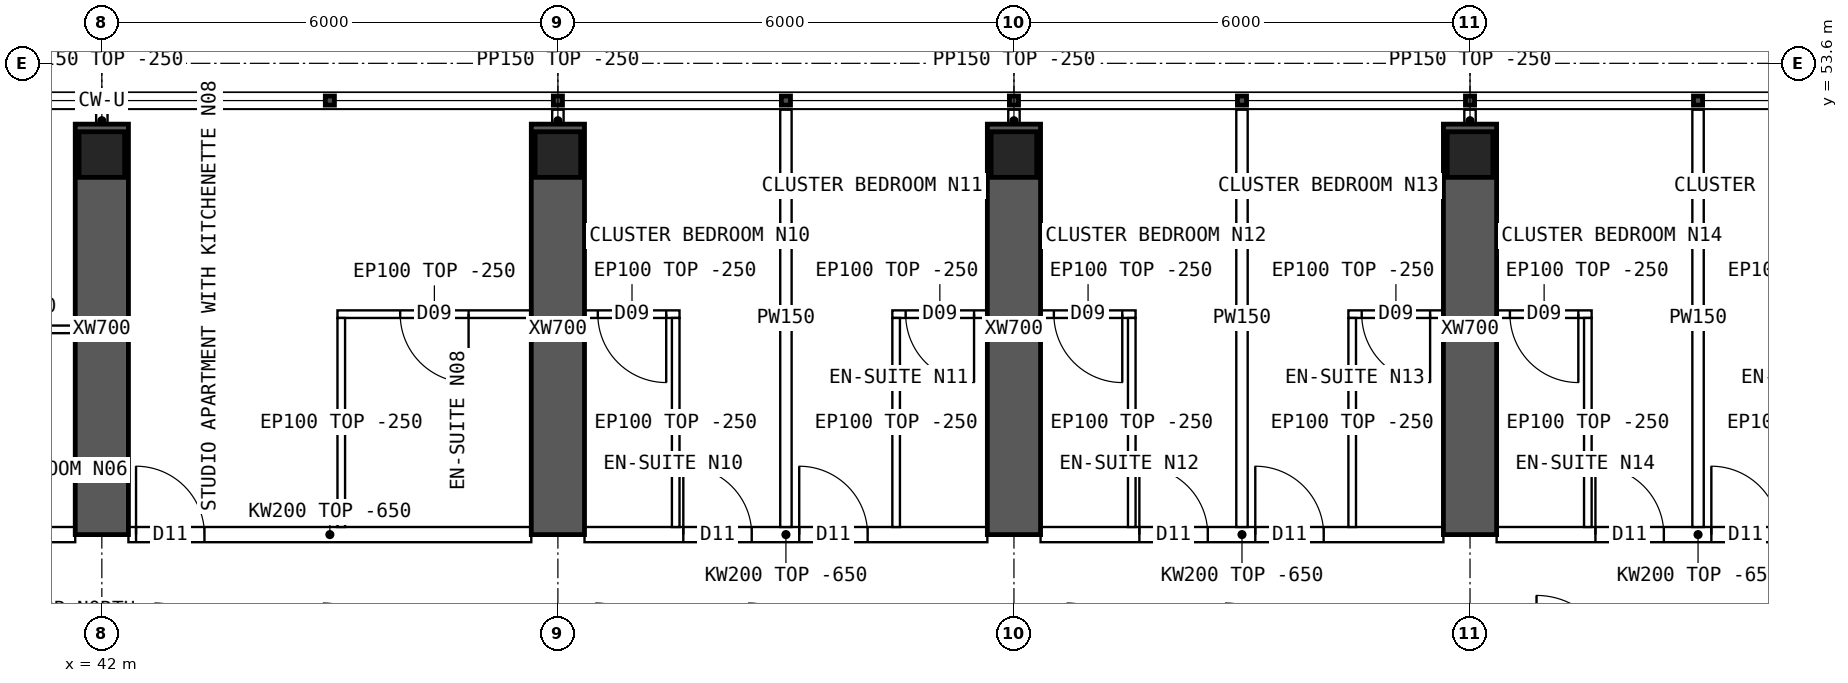
"""IFC4 building model, lengths in metres.
Left out: names, types, materials, properties, quantities, classifications, styles, units other than length and angle.
Written with IfcOpenShell. Run it as: python <this file> out.ifc"""

import sys

from ifc_helpers import new_model, si_unit, direction, frame, frame_2d, origin, origin_2d, place, context, subcontext, project, spatial, polyline, rectangle, hollow_rectangle, outline, extrude, element, fill, save


model = new_model("IFC4")
c1 = context("Model", 3, precision=1e-05, world=origin(), true_north=direction((0.0, 1.0)))
c2 = subcontext(c1, "Body", "Model", "MODEL_VIEW")
j1 = project(units=[si_unit("LENGTHUNIT", "METRE"), si_unit("PLANEANGLEUNIT", "RADIAN")], contexts=[c1])
p1 = place(None, origin())
s1 = spatial("IfcSite", under=j1, at=p1, CompositionType="ELEMENT")
p2 = place(p1, origin())
s2 = spatial("IfcBuilding", under=s1, at=p2, CompositionType="ELEMENT")
p3 = place(p2, frame((0.0, 0.0, 239.05)))
s3 = spatial("IfcBuildingStorey", under=s2, at=p3, CompositionType="ELEMENT", Elevation=239.05)
for number, where, z_axis, x_axis in (
    (1, (42.0, 52.4, 0.0), (0.0, 0.0, 1.0), (1.0, 0.0, 0.0)),
    (2, (48.0, 52.4, 0.0), (0.0, 0.0, 1.0), (1.0, 0.0, 0.0)),
    (3, (54.0, 52.4, 0.0), (0.0, 0.0, 1.0), (1.0, 0.0, 0.0)),
    (4, (60.0, 52.4, 0.0), (0.0, 0.0, 1.0), (1.0, 0.0, 0.0)),
):
    element("IfcColumn", number, at=place(p3, frame(where, z_axis=z_axis, x_axis=x_axis)), inside=s3, PredefinedType="COLUMN", context=c2, shape_type="SweptSolid", body=[
        extrude(hollow_rectangle(XDim=0.6, YDim=0.6, WallThickness=0.06, at=origin_2d()), origin(), (0.0, 0.0, 1.0), 3.75),
    ])
for number, where, z_axis, x_axis in (
    (5, (42.0, 47.4, 0.0), (0.0, 0.0, 1.0), (0.0, 1.0, 0.0)),
    (6, (48.0, 47.4, 0.0), (0.0, 0.0, 1.0), (0.0, 1.0, 0.0)),
    (7, (54.0, 47.4, 0.0), (0.0, 0.0, 1.0), (0.0, 1.0, 0.0)),
    (8, (60.0, 47.4, 0.0), (0.0, 0.0, 1.0), (0.0, 1.0, 0.0)),
):
    element("IfcWall", number, at=place(p3, frame(where, z_axis=z_axis, x_axis=x_axis)), inside=s3, PredefinedType="SHEAR", context=c2, shape_type="SweptSolid", body=[
        extrude(rectangle(XDim=5.4, YDim=0.7, at=frame_2d((2.7, 0.0))), origin(), (0.0, 0.0, 1.0), 3.75),
    ])
p4 = place(p3, frame((36.35, 47.4, 0.0), z_axis=(0.0, 0.0, 1.0), x_axis=(1.0, 0.0, 0.0)))
e9 = element("IfcWall", 9, at=p4, inside=s3, PredefinedType="SOLIDWALL", context=c2, shape_type="SweptSolid", body=[
    extrude(outline(polyline([(0.0, 0.0), (5.3, 0.0), (5.3, 3.1), (0.0, 3.1), (0.0, 0.0)])), frame((0.0, 0.1, 0.0), z_axis=(0.0, -1.0, 0.0), x_axis=(1.0, 0.0, 0.0)), (0.0, 0.0, 1.0), 0.2),
])
p5 = place(p4, frame((0.3, 0.0, 0.0)))
e10 = element("IfcOpeningElement", 10, at=p5, cuts=e9, PredefinedType="OPENING", context=c2, shape_type="SweptSolid", body=[
    extrude(rectangle(XDim=1.0, YDim=2.1, at=frame_2d((0.5, 1.05))), frame((0.0, 0.11, 0.0), z_axis=(0.0, -1.0, 0.0), x_axis=(1.0, 0.0, 0.0)), (0.0, 0.0, 1.0), 0.22),
])
p6 = place(p3, frame((42.35, 47.4, 0.0), z_axis=(0.0, 0.0, 1.0), x_axis=(1.0, 0.0, 0.0)))
e11 = element("IfcWall", 11, at=p6, inside=s3, PredefinedType="SOLIDWALL", context=c2, shape_type="SweptSolid", body=[
    extrude(outline(polyline([(0.0, 0.0), (5.3, 0.0), (5.3, 3.1), (0.0, 3.1), (0.0, 0.0)])), frame((0.0, 0.1, 0.0), z_axis=(0.0, -1.0, 0.0), x_axis=(1.0, 0.0, 0.0)), (0.0, 0.0, 1.0), 0.2),
])
p7 = place(p6, frame((0.1, 0.0, 0.0)))
e12 = element("IfcOpeningElement", 12, at=p7, cuts=e11, PredefinedType="OPENING", context=c2, shape_type="SweptSolid", body=[
    extrude(rectangle(XDim=0.9, YDim=2.1, at=frame_2d((0.45, 1.05))), frame((0.0, 0.11, 0.0), z_axis=(0.0, -1.0, 0.0), x_axis=(1.0, 0.0, 0.0)), (0.0, 0.0, 1.0), 0.22),
])
p8 = place(p3, frame((48.35, 47.4, 0.0), z_axis=(0.0, 0.0, 1.0), x_axis=(1.0, 0.0, 0.0)))
e13 = element("IfcWall", 13, at=p8, inside=s3, PredefinedType="SOLIDWALL", context=c2, shape_type="SweptSolid", body=[
    extrude(outline(polyline([(0.0, 0.0), (5.3, 0.0), (5.3, 3.1), (0.0, 3.1), (0.0, 0.0)])), frame((0.0, 0.1, 0.0), z_axis=(0.0, -1.0, 0.0), x_axis=(1.0, 0.0, 0.0)), (0.0, 0.0, 1.0), 0.2),
])
p9 = place(p8, frame((1.3, 0.0, 0.0)))
e14 = element("IfcOpeningElement", 14, at=p9, cuts=e13, PredefinedType="OPENING", context=c2, shape_type="SweptSolid", body=[
    extrude(rectangle(XDim=0.9, YDim=2.1, at=frame_2d((0.45, 1.05))), frame((0.0, 0.11, 0.0), z_axis=(0.0, -1.0, 0.0), x_axis=(1.0, 0.0, 0.0)), (0.0, 0.0, 1.0), 0.22),
])
p10 = place(p8, frame((2.825, 0.0, 0.0)))
e15 = element("IfcOpeningElement", 15, at=p10, cuts=e13, PredefinedType="OPENING", context=c2, shape_type="SweptSolid", body=[
    extrude(rectangle(XDim=0.9, YDim=2.1, at=frame_2d((0.45, 1.05))), frame((0.0, 0.11, 0.0), z_axis=(0.0, -1.0, 0.0), x_axis=(1.0, 0.0, 0.0)), (0.0, 0.0, 1.0), 0.22),
])
p11 = place(p3, frame((54.35, 47.4, 0.0), z_axis=(0.0, 0.0, 1.0), x_axis=(1.0, 0.0, 0.0)))
e16 = element("IfcWall", 16, at=p11, inside=s3, PredefinedType="SOLIDWALL", context=c2, shape_type="SweptSolid", body=[
    extrude(outline(polyline([(0.0, 0.0), (5.3, 0.0), (5.3, 3.1), (0.0, 3.1), (0.0, 0.0)])), frame((0.0, 0.1, 0.0), z_axis=(0.0, -1.0, 0.0), x_axis=(1.0, 0.0, 0.0)), (0.0, 0.0, 1.0), 0.2),
])
p12 = place(p11, frame((1.3, 0.0, 0.0)))
e17 = element("IfcOpeningElement", 17, at=p12, cuts=e16, PredefinedType="OPENING", context=c2, shape_type="SweptSolid", body=[
    extrude(rectangle(XDim=0.9, YDim=2.1, at=frame_2d((0.45, 1.05))), frame((0.0, 0.11, 0.0), z_axis=(0.0, -1.0, 0.0), x_axis=(1.0, 0.0, 0.0)), (0.0, 0.0, 1.0), 0.22),
])
p13 = place(p11, frame((2.825, 0.0, 0.0)))
e18 = element("IfcOpeningElement", 18, at=p13, cuts=e16, PredefinedType="OPENING", context=c2, shape_type="SweptSolid", body=[
    extrude(rectangle(XDim=0.9, YDim=2.1, at=frame_2d((0.45, 1.05))), frame((0.0, 0.11, 0.0), z_axis=(0.0, -1.0, 0.0), x_axis=(1.0, 0.0, 0.0)), (0.0, 0.0, 1.0), 0.22),
])
p14 = place(p3, frame((60.35, 47.4, 0.0), z_axis=(0.0, 0.0, 1.0), x_axis=(1.0, 0.0, 0.0)))
e19 = element("IfcWall", 19, at=p14, inside=s3, PredefinedType="SOLIDWALL", context=c2, shape_type="SweptSolid", body=[
    extrude(outline(polyline([(0.0, 0.0), (5.3, 0.0), (5.3, 3.1), (0.0, 3.1), (0.0, 0.0)])), frame((0.0, 0.1, 0.0), z_axis=(0.0, -1.0, 0.0), x_axis=(1.0, 0.0, 0.0)), (0.0, 0.0, 1.0), 0.2),
])
p15 = place(p14, frame((1.3, 0.0, 0.0)))
e20 = element("IfcOpeningElement", 20, at=p15, cuts=e19, PredefinedType="OPENING", context=c2, shape_type="SweptSolid", body=[
    extrude(rectangle(XDim=0.9, YDim=2.1, at=frame_2d((0.45, 1.05))), frame((0.0, 0.11, 0.0), z_axis=(0.0, -1.0, 0.0), x_axis=(1.0, 0.0, 0.0)), (0.0, 0.0, 1.0), 0.22),
])
p16 = place(p14, frame((2.825, 0.0, 0.0)))
e21 = element("IfcOpeningElement", 21, at=p16, cuts=e19, PredefinedType="OPENING", context=c2, shape_type="SweptSolid", body=[
    extrude(rectangle(XDim=0.9, YDim=2.1, at=frame_2d((0.45, 1.05))), frame((0.0, 0.11, 0.0), z_axis=(0.0, -1.0, 0.0), x_axis=(1.0, 0.0, 0.0)), (0.0, 0.0, 1.0), 0.22),
])
p17 = place(p3, frame((39.0, 50.1, 0.0), z_axis=(0.0, 0.0, 1.0), x_axis=(1.0, 0.0, 0.0)))
e22 = element("IfcWall", 22, at=p17, inside=s3, PredefinedType="PARTITIONING", context=c2, shape_type="SweptSolid", body=[
    extrude(rectangle(XDim=2.65, YDim=0.1, at=frame_2d((1.325, 0.0))), origin(), (0.0, 0.0, 1.0), 3.5),
])
p18 = place(p3, frame((45.1, 50.3, 0.0), z_axis=(0.0, 0.0, 1.0), x_axis=(1.0, 0.0, 0.0)))
e23 = element("IfcWall", 23, at=p18, inside=s3, PredefinedType="PARTITIONING", context=c2, shape_type="SweptSolid", body=[
    extrude(rectangle(XDim=2.55, YDim=0.1, at=frame_2d((1.275, 0.0))), origin(), (0.0, 0.0, 1.0), 3.5),
])
p19 = place(p18, frame((0.825, 0.0, 0.0)))
e24 = element("IfcOpeningElement", 24, at=p19, cuts=e23, PredefinedType="OPENING", context=c2, shape_type="SweptSolid", body=[
    extrude(rectangle(XDim=0.9, YDim=2.1, at=frame_2d((0.45, 1.05))), frame((0.0, 0.06, 0.0), z_axis=(0.0, -1.0, 0.0), x_axis=(1.0, 0.0, 0.0)), (0.0, 0.0, 1.0), 0.12),
])
p20 = place(p3, frame((45.15, 50.25, 0.0), z_axis=(0.0, 0.0, 1.0), x_axis=(0.0, -1.0, 0.0)))
e25 = element("IfcWall", 25, at=p20, inside=s3, PredefinedType="PARTITIONING", context=c2, shape_type="SweptSolid", body=[
    extrude(outline(polyline([(0.0, 0.0), (2.75, 0.0), (2.75, 3.1), (2.702, 3.1), (2.7, 3.5), (0.0, 3.5), (0.0, 0.0)])), frame((0.0, 0.05, 0.0), z_axis=(0.0, -1.0, 0.0), x_axis=(1.0, 0.0, 0.0)), (0.0, 0.0, 1.0), 0.1),
])
p21 = place(p3, frame((51.0, 52.99, 0.0), z_axis=(0.0, 0.0, 1.0), x_axis=(0.0, -1.0, 0.0)))
e26 = element("IfcWall", 26, at=p21, inside=s3, PredefinedType="PARTITIONING", context=c2, shape_type="SweptSolid", body=[
    extrude(outline(polyline([(0.0, 0.0), (5.49, 0.0), (5.49, 3.1), (5.442, 3.1), (5.44, 3.5), (0.792, 3.5), (0.79, 3.1), (0.392, 3.1), (0.39, 3.5), (0.0, 3.5), (0.0, 0.0)])), frame((0.0, 0.075, 0.0), z_axis=(0.0, -1.0, 0.0), x_axis=(1.0, 0.0, 0.0)), (0.0, 0.0, 1.0), 0.15),
])
p22 = place(p3, frame((48.35, 50.3, 0.0), z_axis=(0.0, 0.0, 1.0), x_axis=(1.0, 0.0, 0.0)))
e27 = element("IfcWall", 27, at=p22, inside=s3, PredefinedType="PARTITIONING", context=c2, shape_type="SweptSolid", body=[
    extrude(rectangle(XDim=1.25, YDim=0.1, at=frame_2d((0.625, 0.0))), origin(), (0.0, 0.0, 1.0), 3.5),
])
p23 = place(p22, frame((0.175, 0.0, 0.0)))
e28 = element("IfcOpeningElement", 28, at=p23, cuts=e27, PredefinedType="OPENING", context=c2, shape_type="SweptSolid", body=[
    extrude(rectangle(XDim=0.9, YDim=2.1, at=frame_2d((0.45, 1.05))), frame((0.0, 0.06, 0.0), z_axis=(0.0, -1.0, 0.0), x_axis=(1.0, 0.0, 0.0)), (0.0, 0.0, 1.0), 0.12),
])
p24 = place(p3, frame((49.55, 50.25, 0.0), z_axis=(0.0, 0.0, 1.0), x_axis=(0.0, -1.0, 0.0)))
e29 = element("IfcWall", 29, at=p24, inside=s3, PredefinedType="PARTITIONING", context=c2, shape_type="SweptSolid", body=[
    extrude(outline(polyline([(0.0, 0.0), (2.75, 0.0), (2.75, 3.1), (2.702, 3.1), (2.7, 3.5), (0.0, 3.5), (0.0, 0.0)])), frame((0.0, 0.05, 0.0), z_axis=(0.0, -1.0, 0.0), x_axis=(1.0, 0.0, 0.0)), (0.0, 0.0, 1.0), 0.1),
])
p25 = place(p3, frame((52.4, 50.3, 0.0), z_axis=(0.0, 0.0, 1.0), x_axis=(1.0, 0.0, 0.0)))
e30 = element("IfcWall", 30, at=p25, inside=s3, PredefinedType="PARTITIONING", context=c2, shape_type="SweptSolid", body=[
    extrude(rectangle(XDim=1.25, YDim=0.1, at=frame_2d((0.625, 0.0))), origin(), (0.0, 0.0, 1.0), 3.5),
])
p26 = place(p25, frame((0.175, 0.0, 0.0)))
e31 = element("IfcOpeningElement", 31, at=p26, cuts=e30, PredefinedType="OPENING", context=c2, shape_type="SweptSolid", body=[
    extrude(rectangle(XDim=0.9, YDim=2.1, at=frame_2d((0.45, 1.05))), frame((0.0, 0.06, 0.0), z_axis=(0.0, -1.0, 0.0), x_axis=(1.0, 0.0, 0.0)), (0.0, 0.0, 1.0), 0.12),
])
p27 = place(p3, frame((52.45, 50.25, 0.0), z_axis=(0.0, 0.0, 1.0), x_axis=(0.0, -1.0, 0.0)))
e32 = element("IfcWall", 32, at=p27, inside=s3, PredefinedType="PARTITIONING", context=c2, shape_type="SweptSolid", body=[
    extrude(outline(polyline([(0.0, 0.0), (2.75, 0.0), (2.75, 3.1), (2.702, 3.1), (2.7, 3.5), (0.0, 3.5), (0.0, 0.0)])), frame((0.0, 0.05, 0.0), z_axis=(0.0, -1.0, 0.0), x_axis=(1.0, 0.0, 0.0)), (0.0, 0.0, 1.0), 0.1),
])
p28 = place(p3, frame((57.0, 52.99, 0.0), z_axis=(0.0, 0.0, 1.0), x_axis=(0.0, -1.0, 0.0)))
e33 = element("IfcWall", 33, at=p28, inside=s3, PredefinedType="PARTITIONING", context=c2, shape_type="SweptSolid", body=[
    extrude(outline(polyline([(0.0, 0.0), (5.49, 0.0), (5.49, 3.1), (5.442, 3.1), (5.44, 3.5), (0.792, 3.5), (0.79, 3.1), (0.392, 3.1), (0.39, 3.5), (0.0, 3.5), (0.0, 0.0)])), frame((0.0, 0.075, 0.0), z_axis=(0.0, -1.0, 0.0), x_axis=(1.0, 0.0, 0.0)), (0.0, 0.0, 1.0), 0.15),
])
p29 = place(p3, frame((54.35, 50.3, 0.0), z_axis=(0.0, 0.0, 1.0), x_axis=(1.0, 0.0, 0.0)))
e34 = element("IfcWall", 34, at=p29, inside=s3, PredefinedType="PARTITIONING", context=c2, shape_type="SweptSolid", body=[
    extrude(rectangle(XDim=1.25, YDim=0.1, at=frame_2d((0.625, 0.0))), origin(), (0.0, 0.0, 1.0), 3.5),
])
p30 = place(p29, frame((0.175, 0.0, 0.0)))
e35 = element("IfcOpeningElement", 35, at=p30, cuts=e34, PredefinedType="OPENING", context=c2, shape_type="SweptSolid", body=[
    extrude(rectangle(XDim=0.9, YDim=2.1, at=frame_2d((0.45, 1.05))), frame((0.0, 0.06, 0.0), z_axis=(0.0, -1.0, 0.0), x_axis=(1.0, 0.0, 0.0)), (0.0, 0.0, 1.0), 0.12),
])
p31 = place(p3, frame((55.55, 50.25, 0.0), z_axis=(0.0, 0.0, 1.0), x_axis=(0.0, -1.0, 0.0)))
e36 = element("IfcWall", 36, at=p31, inside=s3, PredefinedType="PARTITIONING", context=c2, shape_type="SweptSolid", body=[
    extrude(outline(polyline([(0.0, 0.0), (2.75, 0.0), (2.75, 3.1), (2.702, 3.1), (2.7, 3.5), (0.0, 3.5), (0.0, 0.0)])), frame((0.0, 0.05, 0.0), z_axis=(0.0, -1.0, 0.0), x_axis=(1.0, 0.0, 0.0)), (0.0, 0.0, 1.0), 0.1),
])
p32 = place(p3, frame((58.4, 50.3, 0.0), z_axis=(0.0, 0.0, 1.0), x_axis=(1.0, 0.0, 0.0)))
e37 = element("IfcWall", 37, at=p32, inside=s3, PredefinedType="PARTITIONING", context=c2, shape_type="SweptSolid", body=[
    extrude(rectangle(XDim=1.25, YDim=0.1, at=frame_2d((0.625, 0.0))), origin(), (0.0, 0.0, 1.0), 3.5),
])
p33 = place(p32, frame((0.175, 0.0, 0.0)))
e38 = element("IfcOpeningElement", 38, at=p33, cuts=e37, PredefinedType="OPENING", context=c2, shape_type="SweptSolid", body=[
    extrude(rectangle(XDim=0.9, YDim=2.1, at=frame_2d((0.45, 1.05))), frame((0.0, 0.06, 0.0), z_axis=(0.0, -1.0, 0.0), x_axis=(1.0, 0.0, 0.0)), (0.0, 0.0, 1.0), 0.12),
])
p34 = place(p3, frame((58.45, 50.25, 0.0), z_axis=(0.0, 0.0, 1.0), x_axis=(0.0, -1.0, 0.0)))
e39 = element("IfcWall", 39, at=p34, inside=s3, PredefinedType="PARTITIONING", context=c2, shape_type="SweptSolid", body=[
    extrude(outline(polyline([(0.0, 0.0), (2.75, 0.0), (2.75, 3.1), (2.702, 3.1), (2.7, 3.5), (0.0, 3.5), (0.0, 0.0)])), frame((0.0, 0.05, 0.0), z_axis=(0.0, -1.0, 0.0), x_axis=(1.0, 0.0, 0.0)), (0.0, 0.0, 1.0), 0.1),
])
p35 = place(p3, frame((63.0, 52.99, 0.0), z_axis=(0.0, 0.0, 1.0), x_axis=(0.0, -1.0, 0.0)))
e40 = element("IfcWall", 40, at=p35, inside=s3, PredefinedType="PARTITIONING", context=c2, shape_type="SweptSolid", body=[
    extrude(outline(polyline([(0.0, 0.0), (5.49, 0.0), (5.49, 3.1), (5.442, 3.1), (5.44, 3.5), (0.792, 3.5), (0.79, 3.1), (0.392, 3.1), (0.39, 3.5), (0.0, 3.5), (0.0, 0.0)])), frame((0.0, 0.075, 0.0), z_axis=(0.0, -1.0, 0.0), x_axis=(1.0, 0.0, 0.0)), (0.0, 0.0, 1.0), 0.15),
])
p36 = place(p3, frame((60.35, 50.3, 0.0), z_axis=(0.0, 0.0, 1.0), x_axis=(1.0, 0.0, 0.0)))
e41 = element("IfcWall", 41, at=p36, inside=s3, PredefinedType="PARTITIONING", context=c2, shape_type="SweptSolid", body=[
    extrude(rectangle(XDim=1.25, YDim=0.1, at=frame_2d((0.625, 0.0))), origin(), (0.0, 0.0, 1.0), 3.5),
])
p37 = place(p36, frame((0.175, 0.0, 0.0)))
e42 = element("IfcOpeningElement", 42, at=p37, cuts=e41, PredefinedType="OPENING", context=c2, shape_type="SweptSolid", body=[
    extrude(rectangle(XDim=0.9, YDim=2.1, at=frame_2d((0.45, 1.05))), frame((0.0, 0.06, 0.0), z_axis=(0.0, -1.0, 0.0), x_axis=(1.0, 0.0, 0.0)), (0.0, 0.0, 1.0), 0.12),
])
p38 = place(p3, frame((61.55, 50.25, 0.0), z_axis=(0.0, 0.0, 1.0), x_axis=(0.0, -1.0, 0.0)))
e43 = element("IfcWall", 43, at=p38, inside=s3, PredefinedType="PARTITIONING", context=c2, shape_type="SweptSolid", body=[
    extrude(outline(polyline([(0.0, 0.0), (2.75, 0.0), (2.75, 3.1), (2.702, 3.1), (2.7, 3.5), (0.0, 3.5), (0.0, 0.0)])), frame((0.0, 0.05, 0.0), z_axis=(0.0, -1.0, 0.0), x_axis=(1.0, 0.0, 0.0)), (0.0, 0.0, 1.0), 0.1),
])
for number, where, z_axis, x_axis in (
    (44, (42.0, 52.7, 0.0), (0.0, 0.0, 1.0), (0.0, 1.0, 0.0)),
    (45, (48.0, 52.7, 0.0), (0.0, 0.0, 1.0), (0.0, 1.0, 0.0)),
    (46, (54.0, 52.7, 0.0), (0.0, 0.0, 1.0), (0.0, 1.0, 0.0)),
    (47, (60.0, 52.7, 0.0), (0.0, 0.0, 1.0), (0.0, 1.0, 0.0)),
):
    element("IfcWall", number, at=place(p3, frame(where, z_axis=z_axis, x_axis=x_axis)), inside=s3, PredefinedType="PARTITIONING", context=c2, shape_type="SweptSolid", body=[
        extrude(rectangle(XDim=0.29, YDim=0.15, at=frame_2d((0.145, 0.0))), origin(), (0.0, 0.0, 1.0), 3.5),
    ])
p39 = place(p19, origin())
e48 = element("IfcDoor", 48, at=p39, inside=s3, OperationType="SINGLE_SWING_RIGHT", PredefinedType="DOOR", context=c2, shape_type="SweptSolid", body=[
    extrude(rectangle(XDim=0.9, YDim=2.1, at=frame_2d((0.45, 1.05))), frame((0.0, 0.025, 0.0), z_axis=(0.0, -1.0, 0.0), x_axis=(1.0, 0.0, 0.0)), (0.0, 0.0, 1.0), 0.05),
])
fill(e24, e48)
p40 = place(p7, origin())
e49 = element("IfcDoor", 49, at=p40, inside=s3, OperationType="SINGLE_SWING_LEFT", PredefinedType="DOOR", context=c2, shape_type="SweptSolid", body=[
    extrude(rectangle(XDim=0.9, YDim=2.1, at=frame_2d((0.45, 1.05))), frame((0.0, 0.025, 0.0), z_axis=(0.0, -1.0, 0.0), x_axis=(1.0, 0.0, 0.0)), (0.0, 0.0, 1.0), 0.05),
])
fill(e12, e49)
p41 = place(p23, origin())
e50 = element("IfcDoor", 50, at=p41, inside=s3, OperationType="SINGLE_SWING_RIGHT", PredefinedType="DOOR", context=c2, shape_type="SweptSolid", body=[
    extrude(rectangle(XDim=0.9, YDim=2.1, at=frame_2d((0.45, 1.05))), frame((0.0, 0.025, 0.0), z_axis=(0.0, -1.0, 0.0), x_axis=(1.0, 0.0, 0.0)), (0.0, 0.0, 1.0), 0.05),
])
fill(e28, e50)
p42 = place(p9, origin())
e51 = element("IfcDoor", 51, at=p42, inside=s3, OperationType="SINGLE_SWING_LEFT", PredefinedType="DOOR", context=c2, shape_type="SweptSolid", body=[
    extrude(rectangle(XDim=0.9, YDim=2.1, at=frame_2d((0.45, 1.05))), frame((0.0, 0.025, 0.0), z_axis=(0.0, -1.0, 0.0), x_axis=(1.0, 0.0, 0.0)), (0.0, 0.0, 1.0), 0.05),
])
fill(e14, e51)
p43 = place(p26, origin())
e52 = element("IfcDoor", 52, at=p43, inside=s3, OperationType="SINGLE_SWING_RIGHT", PredefinedType="DOOR", context=c2, shape_type="SweptSolid", body=[
    extrude(rectangle(XDim=0.9, YDim=2.1, at=frame_2d((0.45, 1.05))), frame((0.0, 0.025, 0.0), z_axis=(0.0, -1.0, 0.0), x_axis=(1.0, 0.0, 0.0)), (0.0, 0.0, 1.0), 0.05),
])
fill(e31, e52)
p44 = place(p10, origin())
e53 = element("IfcDoor", 53, at=p44, inside=s3, OperationType="SINGLE_SWING_LEFT", PredefinedType="DOOR", context=c2, shape_type="SweptSolid", body=[
    extrude(rectangle(XDim=0.9, YDim=2.1, at=frame_2d((0.45, 1.05))), frame((0.0, 0.025, 0.0), z_axis=(0.0, -1.0, 0.0), x_axis=(1.0, 0.0, 0.0)), (0.0, 0.0, 1.0), 0.05),
])
fill(e15, e53)
p45 = place(p30, origin())
e54 = element("IfcDoor", 54, at=p45, inside=s3, OperationType="SINGLE_SWING_RIGHT", PredefinedType="DOOR", context=c2, shape_type="SweptSolid", body=[
    extrude(rectangle(XDim=0.9, YDim=2.1, at=frame_2d((0.45, 1.05))), frame((0.0, 0.025, 0.0), z_axis=(0.0, -1.0, 0.0), x_axis=(1.0, 0.0, 0.0)), (0.0, 0.0, 1.0), 0.05),
])
fill(e35, e54)
p46 = place(p12, origin())
e55 = element("IfcDoor", 55, at=p46, inside=s3, OperationType="SINGLE_SWING_LEFT", PredefinedType="DOOR", context=c2, shape_type="SweptSolid", body=[
    extrude(rectangle(XDim=0.9, YDim=2.1, at=frame_2d((0.45, 1.05))), frame((0.0, 0.025, 0.0), z_axis=(0.0, -1.0, 0.0), x_axis=(1.0, 0.0, 0.0)), (0.0, 0.0, 1.0), 0.05),
])
fill(e17, e55)
p47 = place(p33, origin())
e56 = element("IfcDoor", 56, at=p47, inside=s3, OperationType="SINGLE_SWING_RIGHT", PredefinedType="DOOR", context=c2, shape_type="SweptSolid", body=[
    extrude(rectangle(XDim=0.9, YDim=2.1, at=frame_2d((0.45, 1.05))), frame((0.0, 0.025, 0.0), z_axis=(0.0, -1.0, 0.0), x_axis=(1.0, 0.0, 0.0)), (0.0, 0.0, 1.0), 0.05),
])
fill(e38, e56)
p48 = place(p13, origin())
e57 = element("IfcDoor", 57, at=p48, inside=s3, OperationType="SINGLE_SWING_LEFT", PredefinedType="DOOR", context=c2, shape_type="SweptSolid", body=[
    extrude(rectangle(XDim=0.9, YDim=2.1, at=frame_2d((0.45, 1.05))), frame((0.0, 0.025, 0.0), z_axis=(0.0, -1.0, 0.0), x_axis=(1.0, 0.0, 0.0)), (0.0, 0.0, 1.0), 0.05),
])
fill(e18, e57)
p49 = place(p37, origin())
e58 = element("IfcDoor", 58, at=p49, inside=s3, OperationType="SINGLE_SWING_RIGHT", PredefinedType="DOOR", context=c2, shape_type="SweptSolid", body=[
    extrude(rectangle(XDim=0.9, YDim=2.1, at=frame_2d((0.45, 1.05))), frame((0.0, 0.025, 0.0), z_axis=(0.0, -1.0, 0.0), x_axis=(1.0, 0.0, 0.0)), (0.0, 0.0, 1.0), 0.05),
])
fill(e42, e58)
p50 = place(p15, origin())
e59 = element("IfcDoor", 59, at=p50, inside=s3, OperationType="SINGLE_SWING_LEFT", PredefinedType="DOOR", context=c2, shape_type="SweptSolid", body=[
    extrude(rectangle(XDim=0.9, YDim=2.1, at=frame_2d((0.45, 1.05))), frame((0.0, 0.025, 0.0), z_axis=(0.0, -1.0, 0.0), x_axis=(1.0, 0.0, 0.0)), (0.0, 0.0, 1.0), 0.05),
])
fill(e20, e59)
p51 = place(p16, origin())
e60 = element("IfcDoor", 60, at=p51, inside=s3, OperationType="SINGLE_SWING_LEFT", PredefinedType="DOOR", context=c2, shape_type="SweptSolid", body=[
    extrude(rectangle(XDim=0.9, YDim=2.1, at=frame_2d((0.45, 1.05))), frame((0.0, 0.025, 0.0), z_axis=(0.0, -1.0, 0.0), x_axis=(1.0, 0.0, 0.0)), (0.0, 0.0, 1.0), 0.05),
])
fill(e21, e60)
save(model, sys.argv[1])
